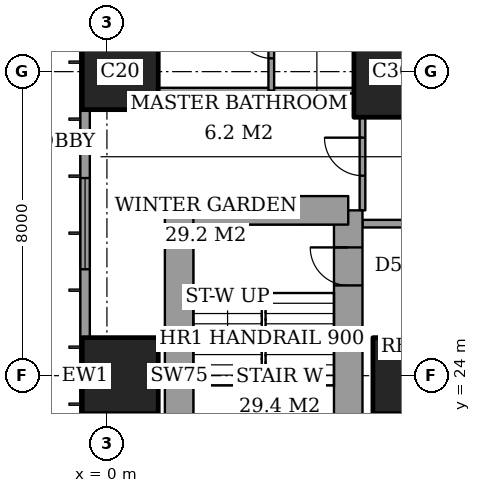
"""IFC4 building model, lengths in metres.
Left out: names, types, materials, properties, quantities, classifications, styles, units other than length and angle.
Written with IfcOpenShell. Run it as: python <this file> out.ifc"""

import sys

from ifc_helpers import new_model, si_unit, direction, frame, frame_2d, origin, origin_2d, place, context, subcontext, project, spatial, rectangle, extrude, element, fill, save


model = new_model("IFC4")
c1 = context("Model", 3, precision=1e-05, world=origin(), true_north=direction((0.0, 1.0)))
c2 = subcontext(c1, "Body", "Model", "MODEL_VIEW")
j1 = project(units=[si_unit("LENGTHUNIT", "METRE"), si_unit("PLANEANGLEUNIT", "RADIAN")], contexts=[c1])
p1 = place(None, origin())
s1 = spatial("IfcSite", under=j1, at=p1, CompositionType="ELEMENT")
p2 = place(p1, origin())
s2 = spatial("IfcBuilding", under=s1, at=p2, CompositionType="ELEMENT")
p3 = place(p2, frame((0.0, 0.0, 153.8)))
s3 = spatial("IfcBuildingStorey", under=s2, at=p3, CompositionType="ELEMENT", Elevation=153.8)
for number, where, z_axis, x_axis in (
    (1, (0.35, 24.0, 0.0), (0.0, 0.0, 1.0), (1.0, 0.0, 0.0)),
    (2, (0.35, 32.0, 0.0), (0.0, 0.0, 1.0), (1.0, 0.0, 0.0)),
    (3, (8.0, 24.0, 0.0), (0.0, 0.0, 1.0), (1.0, 0.0, 0.0)),
):
    element("IfcColumn", number, at=place(p3, frame(where, z_axis=z_axis, x_axis=x_axis)), inside=s3, PredefinedType="COLUMN", context=c2, shape_type="SweptSolid", body=[
        extrude(rectangle(XDim=2.0, YDim=2.0, at=origin_2d()), origin(), (0.0, 0.0, 1.0), 3.6),
    ])
p4 = place(p3, frame((8.0, 32.0, 0.0), z_axis=(0.0, 0.0, 1.0), x_axis=(1.0, 0.0, 0.0)))
e4 = element("IfcColumn", 4, at=p4, inside=s3, PredefinedType="COLUMN", context=c2, shape_type="SweptSolid", body=[
    extrude(rectangle(XDim=3.0, YDim=2.4, at=origin_2d()), origin(), (0.0, 0.0, 1.0), 3.6),
])
p5 = place(p3, frame((6.35, 19.65, 0.0), z_axis=(0.0, 0.0, 1.0), x_axis=(0.0, 1.0, 0.0)))
e5 = element("IfcWall", 5, at=p5, inside=s3, PredefinedType="SHEAR", context=c2, shape_type="SweptSolid", body=[
    extrude(rectangle(XDim=8.7, YDim=0.75, at=frame_2d((4.35, 0.0))), origin(), (0.0, 0.0, 1.0), 3.6),
])
p6 = place(p5, frame((6.725, 0.0, 0.0)))
e6 = element("IfcOpeningElement", 6, at=p6, cuts=e5, PredefinedType="OPENING", context=c2, shape_type="SweptSolid", body=[
    extrude(rectangle(XDim=1.0, YDim=2.1, at=frame_2d((0.5, 1.05))), frame((0.0, 0.385, 0.0), z_axis=(0.0, -1.0, 0.0), x_axis=(1.0, 0.0, 0.0)), (0.0, 0.0, 1.0), 0.77),
])
p7 = place(p3, frame((6.35, 28.35, 0.0), z_axis=(0.0, 0.0, 1.0), x_axis=(-1.0, 0.0, 0.0)))
e7 = element("IfcWall", 7, at=p7, inside=s3, PredefinedType="SHEAR", context=c2, shape_type="SweptSolid", body=[
    extrude(rectangle(XDim=4.45, YDim=0.75, at=frame_2d((2.225, 0.0))), origin(), (0.0, 0.0, 1.0), 3.6),
])
p8 = place(p3, frame((1.9, 28.35, 0.0), z_axis=(0.0, 0.0, 1.0), x_axis=(0.0, -1.0, 0.0)))
e8 = element("IfcWall", 8, at=p8, inside=s3, PredefinedType="SHEAR", context=c2, shape_type="SweptSolid", body=[
    extrude(rectangle(XDim=8.7, YDim=0.75, at=frame_2d((4.35, 0.0))), origin(), (0.0, 0.0, 1.0), 3.6),
])
p9 = place(p3, frame((-0.575, 44.825, 0.0), z_axis=(0.0, 0.0, 1.0), x_axis=(0.0, -1.0, 0.0)))
e9 = element("IfcWall", 9, at=p9, inside=s3, PredefinedType="SOLIDWALL", context=c2, shape_type="SweptSolid", body=[
    extrude(rectangle(XDim=41.65, YDim=0.25, at=frame_2d((20.825, 0.0))), origin(), (0.0, 0.0, 1.0), 3.6),
])
p10 = place(p9, frame((0.775, 0.0, 0.4)))
e10 = element("IfcOpeningElement", 10, at=p10, cuts=e9, PredefinedType="OPENING", context=c2, shape_type="SweptSolid", body=[
    extrude(rectangle(XDim=2.4, YDim=2.2, at=frame_2d((1.2, 1.1))), frame((0.0, 0.135, 0.0), z_axis=(0.0, -1.0, 0.0), x_axis=(1.0, 0.0, 0.0)), (0.0, 0.0, 1.0), 0.27),
])
p11 = place(p9, frame((6.1, 0.0, 0.4)))
e11 = element("IfcOpeningElement", 11, at=p11, cuts=e9, PredefinedType="OPENING", context=c2, shape_type="SweptSolid", body=[
    extrude(rectangle(XDim=1.2, YDim=2.2, at=frame_2d((0.6, 1.1))), frame((0.0, 0.135, 0.0), z_axis=(0.0, -1.0, 0.0), x_axis=(1.0, 0.0, 0.0)), (0.0, 0.0, 1.0), 0.27),
])
p12 = place(p9, frame((8.425, 0.0, 0.4)))
e12 = element("IfcOpeningElement", 12, at=p12, cuts=e9, PredefinedType="OPENING", context=c2, shape_type="SweptSolid", body=[
    extrude(rectangle(XDim=2.4, YDim=2.2, at=frame_2d((1.2, 1.1))), frame((0.0, 0.135, 0.0), z_axis=(0.0, -1.0, 0.0), x_axis=(1.0, 0.0, 0.0)), (0.0, 0.0, 1.0), 0.27),
])
p13 = place(p9, frame((15.625, 0.0, 0.4)))
e13 = element("IfcOpeningElement", 13, at=p13, cuts=e9, PredefinedType="OPENING", context=c2, shape_type="SweptSolid", body=[
    extrude(rectangle(XDim=2.4, YDim=2.2, at=frame_2d((1.2, 1.1))), frame((0.0, 0.135, 0.0), z_axis=(0.0, -1.0, 0.0), x_axis=(1.0, 0.0, 0.0)), (0.0, 0.0, 1.0), 0.27),
])
p14 = place(p9, frame((23.625, 0.0, 0.4)))
e14 = element("IfcOpeningElement", 14, at=p14, cuts=e9, PredefinedType="OPENING", context=c2, shape_type="SweptSolid", body=[
    extrude(rectangle(XDim=2.4, YDim=2.2, at=frame_2d((1.2, 1.1))), frame((0.0, 0.135, 0.0), z_axis=(0.0, -1.0, 0.0), x_axis=(1.0, 0.0, 0.0)), (0.0, 0.0, 1.0), 0.27),
])
p15 = place(p9, frame((30.825, 0.0, 0.4)))
e15 = element("IfcOpeningElement", 15, at=p15, cuts=e9, PredefinedType="OPENING", context=c2, shape_type="SweptSolid", body=[
    extrude(rectangle(XDim=2.4, YDim=2.2, at=frame_2d((1.2, 1.1))), frame((0.0, 0.135, 0.0), z_axis=(0.0, -1.0, 0.0), x_axis=(1.0, 0.0, 0.0)), (0.0, 0.0, 1.0), 0.27),
])
p16 = place(p9, frame((34.5, 0.0, 0.4)))
e16 = element("IfcOpeningElement", 16, at=p16, cuts=e9, PredefinedType="OPENING", context=c2, shape_type="SweptSolid", body=[
    extrude(rectangle(XDim=1.2, YDim=2.2, at=frame_2d((0.6, 1.1))), frame((0.0, 0.135, 0.0), z_axis=(0.0, -1.0, 0.0), x_axis=(1.0, 0.0, 0.0)), (0.0, 0.0, 1.0), 0.27),
])
p17 = place(p9, frame((38.475, 0.0, 0.4)))
e17 = element("IfcOpeningElement", 17, at=p17, cuts=e9, PredefinedType="OPENING", context=c2, shape_type="SweptSolid", body=[
    extrude(rectangle(XDim=2.4, YDim=2.2, at=frame_2d((1.2, 1.1))), frame((0.0, 0.135, 0.0), z_axis=(0.0, -1.0, 0.0), x_axis=(1.0, 0.0, 0.0)), (0.0, 0.0, 1.0), 0.27),
])
p18 = place(p3, frame((6.725, 28.0, 0.0), z_axis=(0.0, 0.0, 1.0), x_axis=(1.0, 0.0, 0.0)))
e18 = element("IfcWall", 18, at=p18, inside=s3, PredefinedType="PARTITIONING", context=c2, shape_type="SweptSolid", body=[
    extrude(rectangle(XDim=17.275, YDim=0.2, at=frame_2d((8.637, 0.0))), origin(), (0.0, 0.0, 1.0), 3.35),
])
p19 = place(p18, frame((6.675, 0.0, 0.0)))
e19 = element("IfcOpeningElement", 19, at=p19, cuts=e18, PredefinedType="OPENING", context=c2, shape_type="SweptSolid", body=[
    extrude(rectangle(XDim=1.2, YDim=2.4, at=frame_2d((0.6, 1.2))), frame((0.0, 0.11, 0.0), z_axis=(0.0, -1.0, 0.0), x_axis=(1.0, 0.0, 0.0)), (0.0, 0.0, 1.0), 0.22),
])
p20 = place(p3, frame((1.35, 31.5, 0.0), z_axis=(0.0, 0.0, 1.0), x_axis=(1.0, 0.0, 0.0)))
e20 = element("IfcWall", 20, at=p20, inside=s3, PredefinedType="PARTITIONING", context=c2, shape_type="SweptSolid", body=[
    extrude(rectangle(XDim=5.15, YDim=0.15, at=frame_2d((2.575, 0.0))), origin(), (0.0, 0.0, 1.0), 3.35),
])
p21 = place(p3, frame((4.325, 31.5, 0.0), z_axis=(0.0, 0.0, 1.0), x_axis=(0.0, 1.0, 0.0)))
e21 = element("IfcWall", 21, at=p21, inside=s3, PredefinedType="PARTITIONING", context=c2, shape_type="SweptSolid", body=[
    extrude(rectangle(XDim=2.6, YDim=0.15, at=frame_2d((1.3, 0.0))), origin(), (0.0, 0.0, 1.0), 3.35),
])
p22 = place(p21, frame((0.85, 0.0, 0.0)))
e22 = element("IfcOpeningElement", 22, at=p22, cuts=e21, PredefinedType="OPENING", context=c2, shape_type="SweptSolid", body=[
    extrude(rectangle(XDim=0.9, YDim=2.1, at=frame_2d((0.45, 1.05))), frame((0.0, 0.085, 0.0), z_axis=(0.0, -1.0, 0.0), x_axis=(1.0, 0.0, 0.0)), (0.0, 0.0, 1.0), 0.17),
])
p23 = place(p3, frame((6.725, 28.35, 0.0), z_axis=(0.0, 0.0, 1.0), x_axis=(0.0, 1.0, 0.0)))
e23 = element("IfcWall", 23, at=p23, inside=s3, PredefinedType="PARTITIONING", context=c2, shape_type="SweptSolid", body=[
    extrude(rectangle(XDim=2.45, YDim=0.15, at=frame_2d((1.225, 0.0))), origin(), (0.0, 0.0, 1.0), 3.35),
])
p24 = place(p23, frame((0.913, 0.0, 0.0)))
e24 = element("IfcOpeningElement", 24, at=p24, cuts=e23, PredefinedType="OPENING", context=c2, shape_type="SweptSolid", body=[
    extrude(rectangle(XDim=1.0, YDim=2.1, at=frame_2d((0.5, 1.05))), frame((0.0, 0.085, 0.0), z_axis=(0.0, -1.0, 0.0), x_axis=(1.0, 0.0, 0.0)), (0.0, 0.0, 1.0), 0.17),
])
p25 = place(p13, origin())
e25 = element("IfcWindow", 25, at=p25, inside=s3, PartitioningType="SINGLE_PANEL", PredefinedType="WINDOW", context=c2, shape_type="SweptSolid", body=[
    extrude(rectangle(XDim=2.4, YDim=2.2, at=frame_2d((1.2, 1.1))), frame((0.0, 0.03, 0.0), z_axis=(0.0, -1.0, 0.0), x_axis=(1.0, 0.0, 0.0)), (0.0, 0.0, 1.0), 0.06),
])
fill(e13, e25)
p26 = place(p22, origin())
e26 = element("IfcDoor", 26, at=p26, inside=s3, OperationType="SINGLE_SWING_LEFT", PredefinedType="DOOR", context=c2, shape_type="SweptSolid", body=[
    extrude(rectangle(XDim=0.9, YDim=2.1, at=frame_2d((0.45, 1.05))), frame((0.0, 0.025, 0.0), z_axis=(0.0, -1.0, 0.0), x_axis=(1.0, 0.0, 0.0)), (0.0, 0.0, 1.0), 0.05),
])
fill(e22, e26)
p27 = place(p24, origin())
e27 = element("IfcDoor", 27, at=p27, inside=s3, OperationType="SINGLE_SWING_LEFT", PredefinedType="DOOR", context=c2, shape_type="SweptSolid", body=[
    extrude(rectangle(XDim=1.0, YDim=2.1, at=frame_2d((0.5, 1.05))), frame((0.0, 0.025, 0.0), z_axis=(0.0, -1.0, 0.0), x_axis=(1.0, 0.0, 0.0)), (0.0, 0.0, 1.0), 0.05),
])
fill(e24, e27)
p28 = place(p6, origin())
e28 = element("IfcDoor", 28, at=p28, inside=s3, OperationType="SINGLE_SWING_LEFT", PredefinedType="DOOR", context=c2, shape_type="SweptSolid", body=[
    extrude(rectangle(XDim=1.0, YDim=2.1, at=frame_2d((0.5, 1.05))), frame((0.0, 0.025, 0.0), z_axis=(0.0, -1.0, 0.0), x_axis=(1.0, 0.0, 0.0)), (0.0, 0.0, 1.0), 0.05),
])
fill(e6, e28)
save(model, sys.argv[1])
